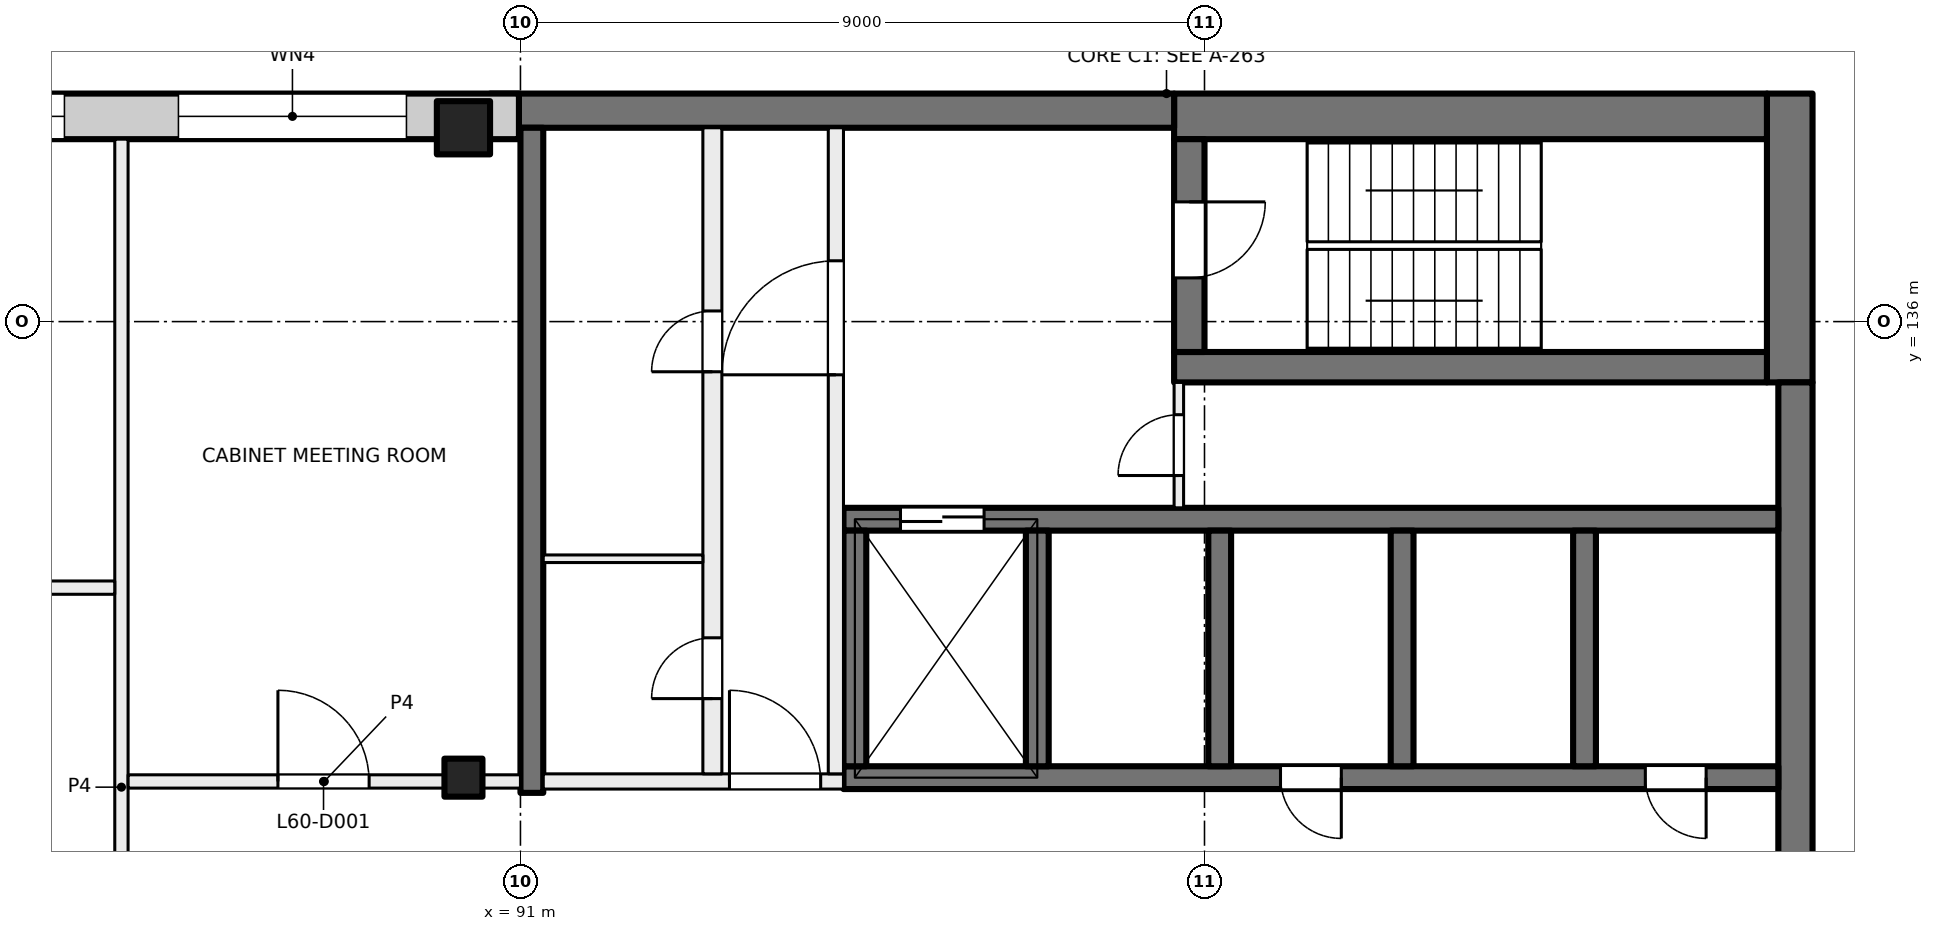
"""IFC4 building model, lengths in metres.
Left out: names, types, materials, properties, quantities, classifications, styles, units other than length and angle.
Written with IfcOpenShell. Run it as: python <this file> out.ifc"""

import sys

from ifc_helpers import new_model, si_unit, direction, frame, frame_2d, origin, origin_2d, place, context, subcontext, project, spatial, rectangle, extrude, element, fill, save


model = new_model("IFC4")
c1 = context("Model", 3, precision=1e-05, world=origin(), true_north=direction((0.0, 1.0)))
c2 = subcontext(c1, "Body", "Model", "MODEL_VIEW")
j1 = project(units=[si_unit("LENGTHUNIT", "METRE"), si_unit("PLANEANGLEUNIT", "RADIAN")], contexts=[c1])
p1 = place(None, origin())
s1 = spatial("IfcSite", under=j1, at=p1, CompositionType="ELEMENT")
p2 = place(p1, origin())
s2 = spatial("IfcBuilding", under=s1, at=p2, CompositionType="ELEMENT")
p3 = place(p2, frame((0.0, 0.0, 253.5)))
s3 = spatial("IfcBuildingStorey", under=s2, at=p3, CompositionType="ELEMENT", Elevation=253.5)
p4 = place(p3, frame((90.25, 130.0, 0.0), z_axis=(0.0, 0.0, 1.0), x_axis=(1.0, 0.0, 0.0)))
e1 = element("IfcColumn", 1, at=p4, inside=s3, PredefinedType="COLUMN", context=c2, shape_type="SweptSolid", body=[
    extrude(rectangle(XDim=0.5, YDim=0.5, at=origin_2d()), origin(), (0.0, 0.0, 1.0), 4.0),
])
p5 = place(p3, frame((90.25, 138.55, 0.0), z_axis=(0.0, 0.0, 1.0), x_axis=(1.0, 0.0, 0.0)))
e2 = element("IfcColumn", 2, at=p5, inside=s3, PredefinedType="COLUMN", context=c2, shape_type="SweptSolid", body=[
    extrude(rectangle(XDim=0.7, YDim=0.7, at=origin_2d()), origin(), (0.0, 0.0, 1.0), 4.0),
])
p6 = place(p3, frame((107.7, 139.0, 0.0), z_axis=(0.0, 0.0, 1.0), x_axis=(0.0, -1.0, 0.0)))
e3 = element("IfcWall", 3, at=p6, inside=s3, PredefinedType="SHEAR", context=c2, shape_type="SweptSolid", body=[
    extrude(rectangle(XDim=3.8, YDim=0.6, at=frame_2d((1.9, 0.0))), origin(), (0.0, 0.0, 1.0), 4.0),
])
p7 = place(p3, frame((107.775, 135.2, 0.0), z_axis=(0.0, 0.0, 1.0), x_axis=(0.0, -1.0, 0.0)))
e4 = element("IfcWall", 4, at=p7, inside=s3, PredefinedType="SHEAR", context=c2, shape_type="SweptSolid", body=[
    extrude(rectangle(XDim=14.4, YDim=0.45, at=frame_2d((7.2, 0.0))), origin(), (0.0, 0.0, 1.0), 4.0),
])
p8 = place(p3, frame((107.4, 138.7, 0.0), z_axis=(0.0, 0.0, 1.0), x_axis=(-1.0, 0.0, 0.0)))
e5 = element("IfcWall", 5, at=p8, inside=s3, PredefinedType="SHEAR", context=c2, shape_type="SweptSolid", body=[
    extrude(rectangle(XDim=7.8, YDim=0.6, at=frame_2d((3.9, 0.0))), origin(), (0.0, 0.0, 1.0), 4.0),
])
p9 = place(p3, frame((99.6, 138.775, 0.0), z_axis=(0.0, 0.0, 1.0), x_axis=(-1.0, 0.0, 0.0)))
e6 = element("IfcWall", 6, at=p9, inside=s3, PredefinedType="SHEAR", context=c2, shape_type="SweptSolid", body=[
    extrude(rectangle(XDim=9.0, YDim=0.45, at=frame_2d((4.5, 0.0))), origin(), (0.0, 0.0, 1.0), 4.0),
])
p10 = place(p3, frame((107.4, 135.4, 0.0), z_axis=(0.0, 0.0, 1.0), x_axis=(-1.0, 0.0, 0.0)))
e7 = element("IfcWall", 7, at=p10, inside=s3, PredefinedType="SHEAR", context=c2, shape_type="SweptSolid", body=[
    extrude(rectangle(XDim=7.8, YDim=0.4, at=frame_2d((3.9, 0.0))), origin(), (0.0, 0.0, 1.0), 4.0),
])
p11 = place(p3, frame((99.8, 138.4, 0.0), z_axis=(0.0, 0.0, 1.0), x_axis=(0.0, -1.0, 0.0)))
e8 = element("IfcWall", 8, at=p11, inside=s3, PredefinedType="SHEAR", context=c2, shape_type="SweptSolid", body=[
    extrude(rectangle(XDim=2.8, YDim=0.4, at=frame_2d((1.4, 0.0))), origin(), (0.0, 0.0, 1.0), 4.0),
])
p12 = place(p11, frame((0.825, 0.0, 0.0)))
e9 = element("IfcOpeningElement", 9, at=p12, cuts=e8, PredefinedType="OPENING", context=c2, shape_type="SweptSolid", body=[
    extrude(rectangle(XDim=1.0, YDim=2.1, at=frame_2d((0.5, 1.05))), frame((0.0, 0.21, 0.0), z_axis=(0.0, -1.0, 0.0), x_axis=(1.0, 0.0, 0.0)), (0.0, 0.0, 1.0), 0.42),
])
p13 = place(p3, frame((107.55, 130.0, 0.0), z_axis=(0.0, 0.0, 1.0), x_axis=(-1.0, 0.0, 0.0)))
e10 = element("IfcWall", 10, at=p13, inside=s3, PredefinedType="SHEAR", context=c2, shape_type="SweptSolid", body=[
    extrude(rectangle(XDim=12.3, YDim=0.3, at=frame_2d((6.15, 0.0))), origin(), (0.0, 0.0, 1.0), 4.0),
])
p14 = place(p13, frame((0.95, 0.0, 0.0)))
e11 = element("IfcOpeningElement", 11, at=p14, cuts=e10, PredefinedType="OPENING", context=c2, shape_type="SweptSolid", body=[
    extrude(rectangle(XDim=0.8, YDim=2.1, at=frame_2d((0.4, 1.05))), frame((0.0, 0.16, 0.0), z_axis=(0.0, -1.0, 0.0), x_axis=(1.0, 0.0, 0.0)), (0.0, 0.0, 1.0), 0.32),
])
p15 = place(p13, frame((5.75, 0.0, 0.0)))
e12 = element("IfcOpeningElement", 12, at=p15, cuts=e10, PredefinedType="OPENING", context=c2, shape_type="SweptSolid", body=[
    extrude(rectangle(XDim=0.8, YDim=2.1, at=frame_2d((0.4, 1.05))), frame((0.0, 0.16, 0.0), z_axis=(0.0, -1.0, 0.0), x_axis=(1.0, 0.0, 0.0)), (0.0, 0.0, 1.0), 0.32),
])
p16 = place(p3, frame((107.55, 133.4, 0.0), z_axis=(0.0, 0.0, 1.0), x_axis=(-1.0, 0.0, 0.0)))
e13 = element("IfcWall", 13, at=p16, inside=s3, PredefinedType="SHEAR", context=c2, shape_type="SweptSolid", body=[
    extrude(rectangle(XDim=12.3, YDim=0.3, at=frame_2d((6.15, 0.0))), origin(), (0.0, 0.0, 1.0), 4.0),
])
p17 = place(p16, frame((10.45, 0.0, 0.0)))
e14 = element("IfcOpeningElement", 14, at=p17, cuts=e13, PredefinedType="OPENING", context=c2, shape_type="SweptSolid", body=[
    extrude(rectangle(XDim=1.1, YDim=2.1, at=frame_2d((0.55, 1.05))), frame((0.0, 0.16, 0.0), z_axis=(0.0, -1.0, 0.0), x_axis=(1.0, 0.0, 0.0)), (0.0, 0.0, 1.0), 0.32),
])
for number, where, z_axis, x_axis in (
    (15, (105.0, 133.25, 0.0), (0.0, 0.0, 1.0), (0.0, -1.0, 0.0)),
    (16, (102.6, 133.25, 0.0), (0.0, 0.0, 1.0), (0.0, -1.0, 0.0)),
    (17, (100.2, 133.25, 0.0), (0.0, 0.0, 1.0), (0.0, -1.0, 0.0)),
    (18, (97.8, 133.25, 0.0), (0.0, 0.0, 1.0), (0.0, -1.0, 0.0)),
    (19, (95.4, 133.25, 0.0), (0.0, 0.0, 1.0), (0.0, -1.0, 0.0)),
):
    element("IfcWall", number, at=place(p3, frame(where, z_axis=z_axis, x_axis=x_axis)), inside=s3, PredefinedType="SHEAR", context=c2, shape_type="SweptSolid", body=[
        extrude(rectangle(XDim=3.1, YDim=0.3, at=frame_2d((1.55, 0.0))), origin(), (0.0, 0.0, 1.0), 4.0),
    ])
p18 = place(p3, frame((91.15, 138.55, 0.0), z_axis=(0.0, 0.0, 1.0), x_axis=(0.0, -1.0, 0.0)))
e20 = element("IfcWall", 20, at=p18, inside=s3, PredefinedType="SHEAR", context=c2, shape_type="SweptSolid", body=[
    extrude(rectangle(XDim=8.75, YDim=0.3, at=frame_2d((4.375, 0.0))), origin(), (0.0, 0.0, 1.0), 4.0),
])
p19 = place(p3, frame((47.07, 138.7, 0.0), z_axis=(0.0, 0.0, 1.0), x_axis=(1.0, 0.0, 0.0)))
e21 = element("IfcWall", 21, at=p19, inside=s3, PredefinedType="SOLIDWALL", context=c2, shape_type="SweptSolid", body=[
    extrude(rectangle(XDim=43.91, YDim=0.6, at=frame_2d((21.955, 0.0))), origin(), (0.0, 0.0, 1.0), 3.625),
])
p20 = place(p19, frame((3.43, 0.0, 0.9)))
e22 = element("IfcOpeningElement", 22, at=p20, cuts=e21, PredefinedType="OPENING", context=c2, shape_type="SweptSolid", body=[
    extrude(rectangle(XDim=3.0, YDim=2.4, at=frame_2d((1.5, 1.2))), frame((0.0, 0.31, 0.0), z_axis=(0.0, -1.0, 0.0), x_axis=(1.0, 0.0, 0.0)), (0.0, 0.0, 1.0), 0.62),
])
p21 = place(p19, frame((8.53, 0.0, 0.0)))
e23 = element("IfcOpeningElement", 23, at=p21, cuts=e21, PredefinedType="OPENING", context=c2, shape_type="SweptSolid", body=[
    extrude(rectangle(XDim=1.8, YDim=2.4, at=frame_2d((0.9, 1.2))), frame((0.0, 0.31, 0.0), z_axis=(0.0, -1.0, 0.0), x_axis=(1.0, 0.0, 0.0)), (0.0, 0.0, 1.0), 0.62),
])
p22 = place(p19, frame((12.43, 0.0, 0.9)))
e24 = element("IfcOpeningElement", 24, at=p22, cuts=e21, PredefinedType="OPENING", context=c2, shape_type="SweptSolid", body=[
    extrude(rectangle(XDim=3.0, YDim=2.4, at=frame_2d((1.5, 1.2))), frame((0.0, 0.31, 0.0), z_axis=(0.0, -1.0, 0.0), x_axis=(1.0, 0.0, 0.0)), (0.0, 0.0, 1.0), 0.62),
])
p23 = place(p19, frame((16.93, 0.0, 0.9)))
e25 = element("IfcOpeningElement", 25, at=p23, cuts=e21, PredefinedType="OPENING", context=c2, shape_type="SweptSolid", body=[
    extrude(rectangle(XDim=3.0, YDim=2.4, at=frame_2d((1.5, 1.2))), frame((0.0, 0.31, 0.0), z_axis=(0.0, -1.0, 0.0), x_axis=(1.0, 0.0, 0.0)), (0.0, 0.0, 1.0), 0.62),
])
p24 = place(p19, frame((22.03, 0.0, 0.0)))
e26 = element("IfcOpeningElement", 26, at=p24, cuts=e21, PredefinedType="OPENING", context=c2, shape_type="SweptSolid", body=[
    extrude(rectangle(XDim=1.8, YDim=2.4, at=frame_2d((0.9, 1.2))), frame((0.0, 0.31, 0.0), z_axis=(0.0, -1.0, 0.0), x_axis=(1.0, 0.0, 0.0)), (0.0, 0.0, 1.0), 0.62),
])
p25 = place(p19, frame((25.93, 0.0, 0.9)))
e27 = element("IfcOpeningElement", 27, at=p25, cuts=e21, PredefinedType="OPENING", context=c2, shape_type="SweptSolid", body=[
    extrude(rectangle(XDim=3.0, YDim=2.4, at=frame_2d((1.5, 1.2))), frame((0.0, 0.31, 0.0), z_axis=(0.0, -1.0, 0.0), x_axis=(1.0, 0.0, 0.0)), (0.0, 0.0, 1.0), 0.62),
])
p26 = place(p19, frame((30.43, 0.0, 0.9)))
e28 = element("IfcOpeningElement", 28, at=p26, cuts=e21, PredefinedType="OPENING", context=c2, shape_type="SweptSolid", body=[
    extrude(rectangle(XDim=3.0, YDim=2.4, at=frame_2d((1.5, 1.2))), frame((0.0, 0.31, 0.0), z_axis=(0.0, -1.0, 0.0), x_axis=(1.0, 0.0, 0.0)), (0.0, 0.0, 1.0), 0.62),
])
p27 = place(p19, frame((34.93, 0.0, 0.9)))
e29 = element("IfcOpeningElement", 29, at=p27, cuts=e21, PredefinedType="OPENING", context=c2, shape_type="SweptSolid", body=[
    extrude(rectangle(XDim=3.0, YDim=2.4, at=frame_2d((1.5, 1.2))), frame((0.0, 0.31, 0.0), z_axis=(0.0, -1.0, 0.0), x_axis=(1.0, 0.0, 0.0)), (0.0, 0.0, 1.0), 0.62),
])
p28 = place(p19, frame((39.43, 0.0, 0.9)))
e30 = element("IfcOpeningElement", 30, at=p28, cuts=e21, PredefinedType="OPENING", context=c2, shape_type="SweptSolid", body=[
    extrude(rectangle(XDim=3.0, YDim=2.4, at=frame_2d((1.5, 1.2))), frame((0.0, 0.31, 0.0), z_axis=(0.0, -1.0, 0.0), x_axis=(1.0, 0.0, 0.0)), (0.0, 0.0, 1.0), 0.62),
])
p29 = place(p3, frame((91.3, 129.95, 0.0), z_axis=(0.0, 0.0, 1.0), x_axis=(1.0, 0.0, 0.0)))
e31 = element("IfcWall", 31, at=p29, inside=s3, PredefinedType="PARTITIONING", context=c2, shape_type="SweptSolid", body=[
    extrude(rectangle(XDim=3.95, YDim=0.2, at=frame_2d((1.975, 0.0))), origin(), (0.0, 0.0, 1.0), 3.625),
])
p30 = place(p29, frame((2.45, 0.0, 0.0)))
e32 = element("IfcOpeningElement", 32, at=p30, cuts=e31, PredefinedType="OPENING", context=c2, shape_type="SweptSolid", body=[
    extrude(rectangle(XDim=1.2, YDim=2.1, at=frame_2d((0.6, 1.05))), frame((0.0, 0.11, 0.0), z_axis=(0.0, -1.0, 0.0), x_axis=(1.0, 0.0, 0.0)), (0.0, 0.0, 1.0), 0.22),
])
p31 = place(p3, frame((95.15, 130.05, 0.0), z_axis=(0.0, 0.0, 1.0), x_axis=(0.0, 1.0, 0.0)))
e33 = element("IfcWall", 33, at=p31, inside=s3, PredefinedType="PARTITIONING", context=c2, shape_type="SweptSolid", body=[
    extrude(rectangle(XDim=8.5, YDim=0.2, at=frame_2d((4.25, 0.0))), origin(), (0.0, 0.0, 1.0), 3.625),
])
p32 = place(p31, frame((5.25, 0.0, 0.0)))
e34 = element("IfcOpeningElement", 34, at=p32, cuts=e33, PredefinedType="OPENING", context=c2, shape_type="SweptSolid", body=[
    extrude(rectangle(XDim=1.5, YDim=2.1, at=frame_2d((0.75, 1.05))), frame((0.0, 0.11, 0.0), z_axis=(0.0, -1.0, 0.0), x_axis=(1.0, 0.0, 0.0)), (0.0, 0.0, 1.0), 0.22),
])
p33 = place(p3, frame((93.525, 130.05, 0.0), z_axis=(0.0, 0.0, 1.0), x_axis=(0.0, 1.0, 0.0)))
e35 = element("IfcWall", 35, at=p33, inside=s3, PredefinedType="PARTITIONING", context=c2, shape_type="SweptSolid", body=[
    extrude(rectangle(XDim=8.5, YDim=0.25, at=frame_2d((4.25, 0.0))), origin(), (0.0, 0.0, 1.0), 3.625),
])
p34 = place(p33, frame((0.99, 0.0, 0.0)))
e36 = element("IfcOpeningElement", 36, at=p34, cuts=e35, PredefinedType="OPENING", context=c2, shape_type="SweptSolid", body=[
    extrude(rectangle(XDim=0.8, YDim=2.1, at=frame_2d((0.4, 1.05))), frame((0.0, 0.135, 0.0), z_axis=(0.0, -1.0, 0.0), x_axis=(1.0, 0.0, 0.0)), (0.0, 0.0, 1.0), 0.27),
])
p35 = place(p33, frame((5.29, 0.0, 0.0)))
e37 = element("IfcOpeningElement", 37, at=p35, cuts=e35, PredefinedType="OPENING", context=c2, shape_type="SweptSolid", body=[
    extrude(rectangle(XDim=0.8, YDim=2.1, at=frame_2d((0.4, 1.05))), frame((0.0, 0.135, 0.0), z_axis=(0.0, -1.0, 0.0), x_axis=(1.0, 0.0, 0.0)), (0.0, 0.0, 1.0), 0.27),
])
p36 = place(p3, frame((99.663, 133.55, 0.0), z_axis=(0.0, 0.0, 1.0), x_axis=(0.0, 1.0, 0.0)))
e38 = element("IfcWall", 38, at=p36, inside=s3, PredefinedType="PARTITIONING", context=c2, shape_type="SweptSolid", body=[
    extrude(rectangle(XDim=1.65, YDim=0.125, at=frame_2d((0.825, 0.0))), origin(), (0.0, 0.0, 1.0), 3.625),
])
p37 = place(p36, frame((0.425, 0.0, 0.0)))
e39 = element("IfcOpeningElement", 39, at=p37, cuts=e38, PredefinedType="OPENING", context=c2, shape_type="SweptSolid", body=[
    extrude(rectangle(XDim=0.8, YDim=2.1, at=frame_2d((0.4, 1.05))), frame((0.0, 0.073, 0.0), z_axis=(0.0, -1.0, 0.0), x_axis=(1.0, 0.0, 0.0)), (0.0, 0.0, 1.0), 0.145),
])
p38 = place(p3, frame((91.3, 132.88, 0.0), z_axis=(0.0, 0.0, 1.0), x_axis=(1.0, 0.0, 0.0)))
e40 = element("IfcWall", 40, at=p38, inside=s3, PredefinedType="PARTITIONING", context=c2, shape_type="SweptSolid", body=[
    extrude(rectangle(XDim=2.1, YDim=0.1, at=frame_2d((1.05, 0.0))), origin(), (0.0, 0.0, 1.0), 3.625),
])
p39 = place(p3, frame((85.75, 121.35, 0.0), z_axis=(0.0, 0.0, 1.0), x_axis=(0.0, 1.0, 0.0)))
e41 = element("IfcWall", 41, at=p39, inside=s3, PredefinedType="PARTITIONING", context=c2, shape_type="SweptSolid", body=[
    extrude(rectangle(XDim=17.05, YDim=0.175, at=frame_2d((8.525, 0.0))), origin(), (0.0, 0.0, 1.0), 3.625),
])
p40 = place(p3, frame((85.662, 132.5, 0.0), z_axis=(0.0, 0.0, 1.0), x_axis=(-1.0, 0.0, 0.0)))
e42 = element("IfcWall", 42, at=p40, inside=s3, PredefinedType="PARTITIONING", context=c2, shape_type="SweptSolid", body=[
    extrude(rectangle(XDim=4.324, YDim=0.175, at=frame_2d((2.162, 0.0))), origin(), (0.0, 0.0, 1.0), 3.625),
])
p41 = place(p3, frame((85.838, 129.95, 0.0), z_axis=(0.0, 0.0, 1.0), x_axis=(1.0, 0.0, 0.0)))
e43 = element("IfcWall", 43, at=p41, inside=s3, PredefinedType="PARTITIONING", context=c2, shape_type="SweptSolid", body=[
    extrude(rectangle(XDim=5.162, YDim=0.175, at=frame_2d((2.581, 0.0))), origin(), (0.0, 0.0, 1.0), 3.625),
])
p42 = place(p41, frame((1.971, 0.0, 0.0)))
e44 = element("IfcOpeningElement", 44, at=p42, cuts=e43, PredefinedType="OPENING", context=c2, shape_type="SweptSolid", body=[
    extrude(rectangle(XDim=1.2, YDim=2.1, at=frame_2d((0.6, 1.05))), frame((0.0, 0.097, 0.0), z_axis=(0.0, -1.0, 0.0), x_axis=(1.0, 0.0, 0.0)), (0.0, 0.0, 1.0), 0.195),
])
p43 = place(p27, origin())
e45 = element("IfcWindow", 45, at=p43, inside=s3, PartitioningType="SINGLE_PANEL", PredefinedType="WINDOW", context=c2, shape_type="SweptSolid", body=[
    extrude(rectangle(XDim=3.0, YDim=2.4, at=frame_2d((1.5, 1.2))), frame((0.0, 0.03, 0.0), z_axis=(0.0, -1.0, 0.0), x_axis=(1.0, 0.0, 0.0)), (0.0, 0.0, 1.0), 0.06),
])
fill(e29, e45)
p44 = place(p28, origin())
e46 = element("IfcWindow", 46, at=p44, inside=s3, PartitioningType="SINGLE_PANEL", PredefinedType="WINDOW", context=c2, shape_type="SweptSolid", body=[
    extrude(rectangle(XDim=3.0, YDim=2.4, at=frame_2d((1.5, 1.2))), frame((0.0, 0.03, 0.0), z_axis=(0.0, -1.0, 0.0), x_axis=(1.0, 0.0, 0.0)), (0.0, 0.0, 1.0), 0.06),
])
fill(e30, e46)
p45 = place(p14, origin())
e47 = element("IfcDoor", 47, at=p45, inside=s3, OperationType="SINGLE_SWING_LEFT", PredefinedType="DOOR", context=c2, shape_type="SweptSolid", body=[
    extrude(rectangle(XDim=0.8, YDim=2.1, at=frame_2d((0.4, 1.05))), frame((0.0, 0.025, 0.0), z_axis=(0.0, -1.0, 0.0), x_axis=(1.0, 0.0, 0.0)), (0.0, 0.0, 1.0), 0.05),
])
fill(e11, e47)
p46 = place(p15, origin())
e48 = element("IfcDoor", 48, at=p46, inside=s3, OperationType="SINGLE_SWING_RIGHT", PredefinedType="DOOR", context=c2, shape_type="SweptSolid", body=[
    extrude(rectangle(XDim=0.8, YDim=2.1, at=frame_2d((0.4, 1.05))), frame((0.0, 0.025, 0.0), z_axis=(0.0, -1.0, 0.0), x_axis=(1.0, 0.0, 0.0)), (0.0, 0.0, 1.0), 0.05),
])
fill(e12, e48)
p47 = place(p30, origin())
e49 = element("IfcDoor", 49, at=p47, inside=s3, OperationType="DOUBLE_DOOR_SINGLE_SWING", PredefinedType="DOOR", context=c2, shape_type="SweptSolid", body=[
    extrude(rectangle(XDim=1.2, YDim=2.1, at=frame_2d((0.6, 1.05))), frame((0.0, 0.025, 0.0), z_axis=(0.0, -1.0, 0.0), x_axis=(1.0, 0.0, 0.0)), (0.0, 0.0, 1.0), 0.05),
])
fill(e32, e49)
p48 = place(p32, origin())
e50 = element("IfcDoor", 50, at=p48, inside=s3, OperationType="DOUBLE_DOOR_SINGLE_SWING", PredefinedType="DOOR", context=c2, shape_type="SweptSolid", body=[
    extrude(rectangle(XDim=1.5, YDim=2.1, at=frame_2d((0.75, 1.05))), frame((0.0, 0.025, 0.0), z_axis=(0.0, -1.0, 0.0), x_axis=(1.0, 0.0, 0.0)), (0.0, 0.0, 1.0), 0.05),
])
fill(e34, e50)
p49 = place(p12, origin())
e51 = element("IfcDoor", 51, at=p49, inside=s3, OperationType="SINGLE_SWING_RIGHT", PredefinedType="DOOR", context=c2, shape_type="SweptSolid", body=[
    extrude(rectangle(XDim=1.0, YDim=2.1, at=frame_2d((0.5, 1.05))), frame((0.0, 0.025, 0.0), z_axis=(0.0, -1.0, 0.0), x_axis=(1.0, 0.0, 0.0)), (0.0, 0.0, 1.0), 0.05),
])
fill(e9, e51)
p50 = place(p37, origin())
e52 = element("IfcDoor", 52, at=p50, inside=s3, OperationType="SINGLE_SWING_LEFT", PredefinedType="DOOR", context=c2, shape_type="SweptSolid", body=[
    extrude(rectangle(XDim=0.8, YDim=2.1, at=frame_2d((0.4, 1.05))), frame((0.0, 0.025, 0.0), z_axis=(0.0, -1.0, 0.0), x_axis=(1.0, 0.0, 0.0)), (0.0, 0.0, 1.0), 0.05),
])
fill(e39, e52)
p51 = place(p34, origin())
e53 = element("IfcDoor", 53, at=p51, inside=s3, OperationType="SINGLE_SWING_RIGHT", PredefinedType="DOOR", context=c2, shape_type="SweptSolid", body=[
    extrude(rectangle(XDim=0.8, YDim=2.1, at=frame_2d((0.4, 1.05))), frame((0.0, 0.025, 0.0), z_axis=(0.0, -1.0, 0.0), x_axis=(1.0, 0.0, 0.0)), (0.0, 0.0, 1.0), 0.05),
])
fill(e36, e53)
p52 = place(p35, origin())
e54 = element("IfcDoor", 54, at=p52, inside=s3, OperationType="SINGLE_SWING_LEFT", PredefinedType="DOOR", context=c2, shape_type="SweptSolid", body=[
    extrude(rectangle(XDim=0.8, YDim=2.1, at=frame_2d((0.4, 1.05))), frame((0.0, 0.025, 0.0), z_axis=(0.0, -1.0, 0.0), x_axis=(1.0, 0.0, 0.0)), (0.0, 0.0, 1.0), 0.05),
])
fill(e37, e54)
p53 = place(p17, origin())
e55 = element("IfcDoor", 55, at=p53, inside=s3, OperationType="DOUBLE_DOOR_SLIDING", PredefinedType="DOOR", context=c2, shape_type="SweptSolid", body=[
    extrude(rectangle(XDim=1.1, YDim=2.1, at=frame_2d((0.55, 1.05))), frame((0.0, 0.025, 0.0), z_axis=(0.0, -1.0, 0.0), x_axis=(1.0, 0.0, 0.0)), (0.0, 0.0, 1.0), 0.05),
])
fill(e14, e55)
p54 = place(p42, origin())
e56 = element("IfcDoor", 56, at=p54, inside=s3, OperationType="DOUBLE_DOOR_SINGLE_SWING", PredefinedType="DOOR", context=c2, shape_type="SweptSolid", body=[
    extrude(rectangle(XDim=1.2, YDim=2.1, at=frame_2d((0.6, 1.05))), frame((0.0, 0.025, 0.0), z_axis=(0.0, -1.0, 0.0), x_axis=(1.0, 0.0, 0.0)), (0.0, 0.0, 1.0), 0.05),
])
fill(e44, e56)
save(model, sys.argv[1])
